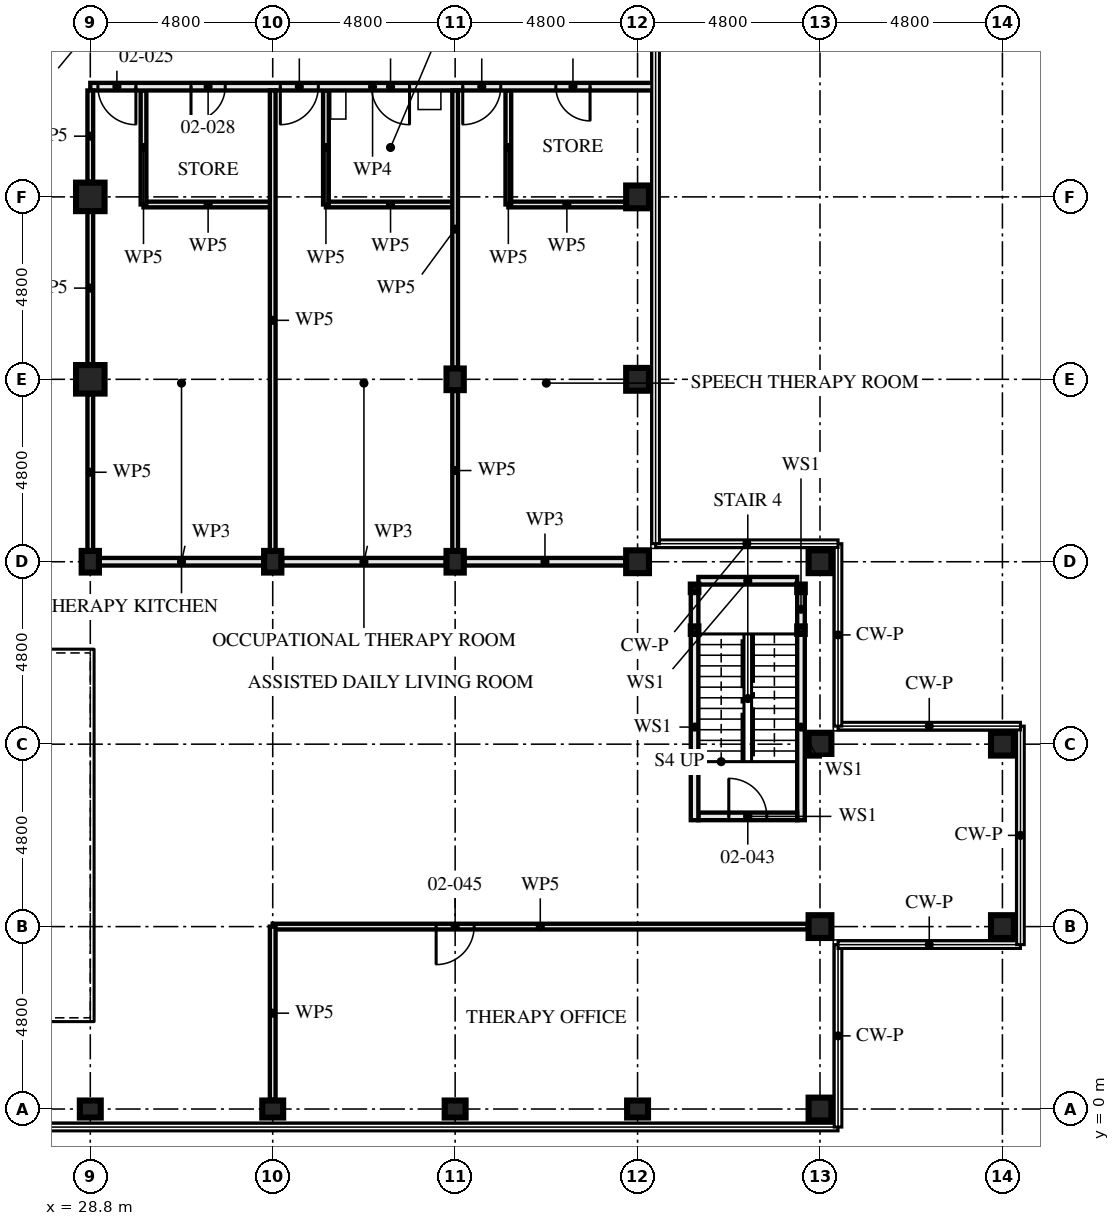
"""IFC4 building model, lengths in metres.
Left out: names, types, materials, properties, quantities, classifications, styles, units other than length and angle.
Written with IfcOpenShell. Run it as: python <this file> out.ifc"""

import sys

from ifc_helpers import new_model, si_unit, direction, frame, frame_2d, origin, origin_2d, place, context, subcontext, project, spatial, rectangle, hollow_rectangle, i_section, extrude, element, fill, save


model = new_model("IFC4")
c1 = context("Model", 3, precision=1e-05, world=origin(), true_north=direction((0.0, 1.0)))
c2 = subcontext(c1, "Body", "Model", "MODEL_VIEW")
j1 = project(units=[si_unit("LENGTHUNIT", "METRE"), si_unit("PLANEANGLEUNIT", "RADIAN")], contexts=[c1])
p1 = place(None, origin())
s1 = spatial("IfcSite", under=j1, at=p1, CompositionType="ELEMENT")
p2 = place(p1, origin())
s2 = spatial("IfcBuilding", under=s1, at=p2, CompositionType="ELEMENT")
p3 = place(p2, frame((0.0, 0.0, 9.0)))
s3 = spatial("IfcBuildingStorey", under=s2, at=p3, CompositionType="ELEMENT", Elevation=9.0)
p4 = place(p3, frame((28.8, 0.0, 0.0), z_axis=(0.0, 0.0, 1.0), x_axis=(0.0, 1.0, 0.0)))
e1 = element("IfcColumn", 1, at=p4, inside=s3, PredefinedType="COLUMN", context=c2, shape_type="SweptSolid", body=[
    extrude(i_section(OverallWidth=0.448, OverallDepth=0.55, WebThickness=0.072, FlangeThickness=0.115, FilletRadius=0.015, at=origin_2d()), origin(), (0.0, 0.0, 1.0), 4.5),
])
p5 = place(p3, frame((28.8, 14.4, 0.0), z_axis=(0.0, 0.0, 1.0), x_axis=(1.0, 0.0, 0.0)))
e2 = element("IfcColumn", 2, at=p5, inside=s3, PredefinedType="COLUMN", context=c2, shape_type="SweptSolid", body=[
    extrude(i_section(OverallWidth=0.454, OverallDepth=0.569, WebThickness=0.078, FlangeThickness=0.125, FilletRadius=0.015, at=origin_2d()), origin(), (0.0, 0.0, 1.0), 4.5),
])
for number, where, z_axis, x_axis in (
    (3, (28.8, 19.2, 0.0), (0.0, 0.0, 1.0), (1.0, 0.0, 0.0)),
    (4, (28.8, 24.0, 0.0), (0.0, 0.0, 1.0), (1.0, 0.0, 0.0)),
):
    element("IfcColumn", number, at=place(p3, frame(where, z_axis=z_axis, x_axis=x_axis)), inside=s3, PredefinedType="COLUMN", context=c2, shape_type="SweptSolid", body=[
        extrude(hollow_rectangle(XDim=0.75, YDim=0.75, WallThickness=0.08, at=origin_2d()), origin(), (0.0, 0.0, 1.0), 4.5),
    ])
p6 = place(p3, frame((33.6, 0.0, 0.0), z_axis=(0.0, 0.0, 1.0), x_axis=(0.0, 1.0, 0.0)))
e5 = element("IfcColumn", 5, at=p6, inside=s3, PredefinedType="COLUMN", context=c2, shape_type="SweptSolid", body=[
    extrude(i_section(OverallWidth=0.448, OverallDepth=0.55, WebThickness=0.072, FlangeThickness=0.115, FilletRadius=0.015, at=origin_2d()), origin(), (0.0, 0.0, 1.0), 4.5),
])
p7 = place(p3, frame((33.6, 14.4, 0.0), z_axis=(0.0, 0.0, 1.0), x_axis=(1.0, 0.0, 0.0)))
e6 = element("IfcColumn", 6, at=p7, inside=s3, PredefinedType="COLUMN", context=c2, shape_type="SweptSolid", body=[
    extrude(i_section(OverallWidth=0.454, OverallDepth=0.569, WebThickness=0.078, FlangeThickness=0.125, FilletRadius=0.015, at=origin_2d()), origin(), (0.0, 0.0, 1.0), 4.5),
])
p8 = place(p3, frame((38.4, 0.0, 0.0), z_axis=(0.0, 0.0, 1.0), x_axis=(0.0, 1.0, 0.0)))
e7 = element("IfcColumn", 7, at=p8, inside=s3, PredefinedType="COLUMN", context=c2, shape_type="SweptSolid", body=[
    extrude(i_section(OverallWidth=0.448, OverallDepth=0.55, WebThickness=0.072, FlangeThickness=0.115, FilletRadius=0.015, at=origin_2d()), origin(), (0.0, 0.0, 1.0), 4.5),
])
for number, where, z_axis, x_axis in (
    (8, (38.4, 14.4, 0.0), (0.0, 0.0, 1.0), (1.0, 0.0, 0.0)),
    (9, (38.4, 19.2, 0.0), (0.0, 0.0, 1.0), (1.0, 0.0, 0.0)),
):
    element("IfcColumn", number, at=place(p3, frame(where, z_axis=z_axis, x_axis=x_axis)), inside=s3, PredefinedType="COLUMN", context=c2, shape_type="SweptSolid", body=[
        extrude(i_section(OverallWidth=0.454, OverallDepth=0.569, WebThickness=0.078, FlangeThickness=0.125, FilletRadius=0.015, at=origin_2d()), origin(), (0.0, 0.0, 1.0), 4.5),
    ])
p9 = place(p3, frame((43.2, 0.0, 0.0), z_axis=(0.0, 0.0, 1.0), x_axis=(0.0, 1.0, 0.0)))
e10 = element("IfcColumn", 10, at=p9, inside=s3, PredefinedType="COLUMN", context=c2, shape_type="SweptSolid", body=[
    extrude(i_section(OverallWidth=0.448, OverallDepth=0.55, WebThickness=0.072, FlangeThickness=0.115, FilletRadius=0.015, at=origin_2d()), origin(), (0.0, 0.0, 1.0), 4.5),
])
p10 = place(p3, frame((43.2, 14.4, 0.0), z_axis=(0.0, 0.0, 1.0), x_axis=(0.0, 1.0, 0.0)))
e11 = element("IfcColumn", 11, at=p10, inside=s3, PredefinedType="COLUMN", context=c2, shape_type="SweptSolid", body=[
    extrude(hollow_rectangle(XDim=0.6, YDim=0.6, WallThickness=0.05, at=origin_2d()), origin(), (0.0, 0.0, 1.0), 4.5),
])
for number, where, z_axis, x_axis in (
    (12, (43.2, 19.2, 0.0), (0.0, 0.0, 1.0), (1.0, 0.0, 0.0)),
    (13, (43.2, 24.0, 0.0), (0.0, 0.0, 1.0), (1.0, 0.0, 0.0)),
):
    element("IfcColumn", number, at=place(p3, frame(where, z_axis=z_axis, x_axis=x_axis)), inside=s3, PredefinedType="COLUMN", context=c2, shape_type="SweptSolid", body=[
        extrude(hollow_rectangle(XDim=0.6, YDim=0.6, WallThickness=0.08, at=origin_2d()), origin(), (0.0, 0.0, 1.0), 4.5),
    ])
for number, where, z_axis, x_axis in (
    (14, (48.0, 0.0, 0.0), (0.0, 0.0, 1.0), (0.0, 1.0, 0.0)),
    (15, (48.0, 4.8, 0.0), (0.0, 0.0, 1.0), (0.0, 1.0, 0.0)),
    (16, (48.0, 9.6, 0.0), (0.0, 0.0, 1.0), (0.0, 1.0, 0.0)),
    (17, (48.0, 14.4, 0.0), (0.0, 0.0, 1.0), (0.0, 1.0, 0.0)),
    (18, (52.8, 4.8, 0.0), (0.0, 0.0, 1.0), (0.0, 1.0, 0.0)),
    (19, (52.8, 9.6, 0.0), (0.0, 0.0, 1.0), (0.0, 1.0, 0.0)),
):
    element("IfcColumn", number, at=place(p3, frame(where, z_axis=z_axis, x_axis=x_axis)), inside=s3, PredefinedType="COLUMN", context=c2, shape_type="SweptSolid", body=[
        extrude(hollow_rectangle(XDim=0.6, YDim=0.6, WallThickness=0.05, at=origin_2d()), origin(), (0.0, 0.0, 1.0), 4.5),
    ])
for number, where, z_axis, x_axis in (
    (20, (44.7, 13.7, 0.0), (0.0, 0.0, 1.0), (1.0, 0.0, 0.0)),
    (21, (47.5, 13.7, 0.0), (0.0, 0.0, 1.0), (1.0, 0.0, 0.0)),
    (22, (44.7, 12.6, 0.0), (0.0, 0.0, 1.0), (1.0, 0.0, 0.0)),
    (23, (47.5, 12.6, 0.0), (0.0, 0.0, 1.0), (1.0, 0.0, 0.0)),
):
    element("IfcColumn", number, at=place(p3, frame(where, z_axis=z_axis, x_axis=x_axis)), inside=s3, PredefinedType="COLUMN", context=c2, shape_type="SweptSolid", body=[
        extrude(hollow_rectangle(XDim=0.2, YDim=0.2, WallThickness=0.008, at=origin_2d()), origin(), (0.0, 0.0, 1.0), 4.33),
    ])
p11 = place(p3, frame((30.2, 23.8, 0.0), z_axis=(0.0, 0.0, 1.0), x_axis=(0.0, 1.0, 0.0)))
e24 = element("IfcWall", 24, at=p11, inside=s3, PredefinedType="PARTITIONING", context=c2, shape_type="SweptSolid", body=[
    extrude(rectangle(XDim=3.0, YDim=0.15, at=frame_2d((1.5, 0.0))), origin(), (0.0, 0.0, 1.0), 3.55),
])
p12 = place(p3, frame((30.2, 23.8, 0.0), z_axis=(0.0, 0.0, 1.0), x_axis=(1.0, 0.0, 0.0)))
e25 = element("IfcWall", 25, at=p12, inside=s3, PredefinedType="PARTITIONING", context=c2, shape_type="SweptSolid", body=[
    extrude(rectangle(XDim=3.4, YDim=0.15, at=frame_2d((1.7, 0.0))), origin(), (0.0, 0.0, 1.0), 4.33),
])
p13 = place(p3, frame((35.0, 23.8, 0.0), z_axis=(0.0, 0.0, 1.0), x_axis=(0.0, 1.0, 0.0)))
e26 = element("IfcWall", 26, at=p13, inside=s3, PredefinedType="PARTITIONING", context=c2, shape_type="SweptSolid", body=[
    extrude(rectangle(XDim=3.0, YDim=0.15, at=frame_2d((1.5, 0.0))), origin(), (0.0, 0.0, 1.0), 3.55),
])
p14 = place(p3, frame((35.0, 23.8, 0.0), z_axis=(0.0, 0.0, 1.0), x_axis=(1.0, 0.0, 0.0)))
e27 = element("IfcWall", 27, at=p14, inside=s3, PredefinedType="PARTITIONING", context=c2, shape_type="SweptSolid", body=[
    extrude(rectangle(XDim=3.4, YDim=0.15, at=frame_2d((1.7, 0.0))), origin(), (0.0, 0.0, 1.0), 4.33),
])
p15 = place(p3, frame((39.8, 23.8, 0.0), z_axis=(0.0, 0.0, 1.0), x_axis=(0.0, 1.0, 0.0)))
e28 = element("IfcWall", 28, at=p15, inside=s3, PredefinedType="PARTITIONING", context=c2, shape_type="SweptSolid", body=[
    extrude(rectangle(XDim=3.0, YDim=0.15, at=frame_2d((1.5, 0.0))), origin(), (0.0, 0.0, 1.0), 3.55),
])
p16 = place(p3, frame((39.8, 23.8, 0.0), z_axis=(0.0, 0.0, 1.0), x_axis=(1.0, 0.0, 0.0)))
e29 = element("IfcWall", 29, at=p16, inside=s3, PredefinedType="PARTITIONING", context=c2, shape_type="SweptSolid", body=[
    extrude(rectangle(XDim=3.08, YDim=0.15, at=frame_2d((1.54, 0.0))), origin(), (0.0, 0.0, 1.0), 4.33),
])
p17 = place(p3, frame((33.6, 14.705, 0.0), z_axis=(0.0, 0.0, 1.0), x_axis=(0.0, 1.0, 0.0)))
e30 = element("IfcWall", 30, at=p17, inside=s3, PredefinedType="PARTITIONING", context=c2, shape_type="SweptSolid", body=[
    extrude(rectangle(XDim=12.095, YDim=0.15, at=frame_2d((6.048, 0.0))), origin(), (0.0, 0.0, 1.0), 3.55),
])
p18 = place(p3, frame((38.4, 14.705, 0.0), z_axis=(0.0, 0.0, 1.0), x_axis=(0.0, 1.0, 0.0)))
e31 = element("IfcWall", 31, at=p18, inside=s3, PredefinedType="PARTITIONING", context=c2, shape_type="SweptSolid", body=[
    extrude(rectangle(XDim=4.191, YDim=0.15, at=frame_2d((2.095, 0.0))), origin(), (0.0, 0.0, 1.0), 3.55),
])
p19 = place(p3, frame((38.4, 19.504, 0.0), z_axis=(0.0, 0.0, 1.0), x_axis=(0.0, 1.0, 0.0)))
e32 = element("IfcWall", 32, at=p19, inside=s3, PredefinedType="PARTITIONING", context=c2, shape_type="SweptSolid", body=[
    extrude(rectangle(XDim=7.296, YDim=0.15, at=frame_2d((3.648, 0.0))), origin(), (0.0, 0.0, 1.0), 3.55),
])
p20 = place(p3, frame((28.8, 26.9, 0.0), z_axis=(0.0, 0.0, 1.0), x_axis=(1.0, 0.0, 0.0)))
e33 = element("IfcWall", 33, at=p20, inside=s3, PredefinedType="PARTITIONING", context=c2, shape_type="SweptSolid", body=[
    extrude(rectangle(XDim=14.855, YDim=0.2, at=frame_2d((7.427, 0.0))), origin(), (0.0, 0.0, 1.0), 3.32),
])
p21 = place(p20, frame((0.2, 0.0, 0.0)))
e34 = element("IfcOpeningElement", 34, at=p21, cuts=e33, PredefinedType="OPENING", context=c2, shape_type="SweptSolid", body=[
    extrude(rectangle(XDim=1.0, YDim=2.4, at=frame_2d((0.5, 1.2))), frame((0.0, 0.111, 0.0), z_axis=(0.0, -1.0, 0.0), x_axis=(1.0, 0.0, 0.0)), (0.0, 0.0, 1.0), 0.221),
])
p22 = place(p20, frame((5.0, 0.0, 0.0)))
e35 = element("IfcOpeningElement", 35, at=p22, cuts=e33, PredefinedType="OPENING", context=c2, shape_type="SweptSolid", body=[
    extrude(rectangle(XDim=1.0, YDim=2.4, at=frame_2d((0.5, 1.2))), frame((0.0, 0.111, 0.0), z_axis=(0.0, -1.0, 0.0), x_axis=(1.0, 0.0, 0.0)), (0.0, 0.0, 1.0), 0.221),
])
p23 = place(p20, frame((9.8, 0.0, 0.0)))
e36 = element("IfcOpeningElement", 36, at=p23, cuts=e33, PredefinedType="OPENING", context=c2, shape_type="SweptSolid", body=[
    extrude(rectangle(XDim=1.0, YDim=2.4, at=frame_2d((0.5, 1.2))), frame((0.0, 0.111, 0.0), z_axis=(0.0, -1.0, 0.0), x_axis=(1.0, 0.0, 0.0)), (0.0, 0.0, 1.0), 0.221),
])
p24 = place(p20, frame((2.65, 0.0, 0.0)))
e37 = element("IfcOpeningElement", 37, at=p24, cuts=e33, PredefinedType="OPENING", context=c2, shape_type="SweptSolid", body=[
    extrude(rectangle(XDim=0.9, YDim=2.1, at=frame_2d((0.45, 1.05))), frame((0.0, 0.111, 0.0), z_axis=(0.0, -1.0, 0.0), x_axis=(1.0, 0.0, 0.0)), (0.0, 0.0, 1.0), 0.221),
])
p25 = place(p20, frame((7.4, 0.0, 0.0)))
e38 = element("IfcOpeningElement", 38, at=p25, cuts=e33, PredefinedType="OPENING", context=c2, shape_type="SweptSolid", body=[
    extrude(rectangle(XDim=1.0, YDim=2.1, at=frame_2d((0.5, 1.05))), frame((0.0, 0.111, 0.0), z_axis=(0.0, -1.0, 0.0), x_axis=(1.0, 0.0, 0.0)), (0.0, 0.0, 1.0), 0.221),
])
p26 = place(p20, frame((12.25, 0.0, 0.0)))
e39 = element("IfcOpeningElement", 39, at=p26, cuts=e33, PredefinedType="OPENING", context=c2, shape_type="SweptSolid", body=[
    extrude(rectangle(XDim=0.9, YDim=2.1, at=frame_2d((0.45, 1.05))), frame((0.0, 0.111, 0.0), z_axis=(0.0, -1.0, 0.0), x_axis=(1.0, 0.0, 0.0)), (0.0, 0.0, 1.0), 0.221),
])
p27 = place(p3, frame((44.7, 13.6, 0.0), z_axis=(0.0, 0.0, 1.0), x_axis=(0.0, -1.0, 0.0)))
e40 = element("IfcWall", 40, at=p27, inside=s3, PredefinedType="SOLIDWALL", context=c2, shape_type="SweptSolid", body=[
    extrude(rectangle(XDim=0.9, YDim=0.2, at=frame_2d((0.45, 0.0))), origin(), (0.0, 0.0, 1.0), 3.99),
])
p28 = place(p3, frame((44.7, 12.5, 0.0), z_axis=(0.0, 0.0, 1.0), x_axis=(0.0, -1.0, 0.0)))
e41 = element("IfcWall", 41, at=p28, inside=s3, PredefinedType="SOLIDWALL", context=c2, shape_type="SweptSolid", body=[
    extrude(rectangle(XDim=4.9, YDim=0.2, at=frame_2d((2.45, 0.0))), origin(), (0.0, 0.0, 1.0), 3.99),
])
p29 = place(p3, frame((47.5, 13.6, 0.0), z_axis=(0.0, 0.0, 1.0), x_axis=(0.0, -1.0, 0.0)))
e42 = element("IfcWall", 42, at=p29, inside=s3, PredefinedType="SOLIDWALL", context=c2, shape_type="SweptSolid", body=[
    extrude(rectangle(XDim=0.9, YDim=0.2, at=frame_2d((0.45, 0.0))), origin(), (0.0, 0.0, 1.0), 3.99),
])
p30 = place(p3, frame((47.5, 12.5, 0.0), z_axis=(0.0, 0.0, 1.0), x_axis=(0.0, -1.0, 0.0)))
e43 = element("IfcWall", 43, at=p30, inside=s3, PredefinedType="SOLIDWALL", context=c2, shape_type="SweptSolid", body=[
    extrude(rectangle(XDim=4.9, YDim=0.2, at=frame_2d((2.45, 0.0))), origin(), (0.0, 0.0, 1.0), 3.99),
])
p31 = place(p3, frame((44.8, 13.9, 0.0), z_axis=(0.0, 0.0, 1.0), x_axis=(1.0, 0.0, 0.0)))
e44 = element("IfcWall", 44, at=p31, inside=s3, PredefinedType="SOLIDWALL", context=c2, shape_type="SweptSolid", body=[
    extrude(rectangle(XDim=2.6, YDim=0.2, at=frame_2d((1.3, 0.0))), origin(), (0.0, 0.0, 1.0), 4.33),
])
p32 = place(p3, frame((44.8, 7.7, 0.0), z_axis=(0.0, 0.0, 1.0), x_axis=(1.0, 0.0, 0.0)))
e45 = element("IfcWall", 45, at=p32, inside=s3, PredefinedType="SOLIDWALL", context=c2, shape_type="SweptSolid", body=[
    extrude(rectangle(XDim=2.6, YDim=0.2, at=frame_2d((1.3, 0.0))), origin(), (0.0, 0.0, 1.0), 4.33),
])
p33 = place(p32, frame((0.8, 0.0, 0.0)))
e46 = element("IfcOpeningElement", 46, at=p33, cuts=e45, PredefinedType="OPENING", context=c2, shape_type="SweptSolid", body=[
    extrude(rectangle(XDim=1.0, YDim=2.1, at=frame_2d((0.5, 1.05))), frame((0.0, 0.111, 0.0), z_axis=(0.0, -1.0, 0.0), x_axis=(1.0, 0.0, 0.0)), (0.0, 0.0, 1.0), 0.221),
])
p34 = place(p3, frame((33.6, 4.8, 0.0), z_axis=(0.0, 0.0, 1.0), x_axis=(1.0, 0.0, 0.0)))
e47 = element("IfcWall", 47, at=p34, inside=s3, PredefinedType="PARTITIONING", context=c2, shape_type="SweptSolid", body=[
    extrude(rectangle(XDim=14.08, YDim=0.15, at=frame_2d((7.04, 0.0))), origin(), (0.0, 0.0, 1.0), 3.55),
])
p35 = place(p34, frame((4.3, 0.0, 0.0)))
e48 = element("IfcOpeningElement", 48, at=p35, cuts=e47, PredefinedType="OPENING", context=c2, shape_type="SweptSolid", body=[
    extrude(rectangle(XDim=1.0, YDim=2.4, at=frame_2d((0.5, 1.2))), frame((0.0, 0.085, 0.0), z_axis=(0.0, -1.0, 0.0), x_axis=(1.0, 0.0, 0.0)), (0.0, 0.0, 1.0), 0.171),
])
p36 = place(p3, frame((33.6, 0.244, 0.0), z_axis=(0.0, 0.0, 1.0), x_axis=(0.0, 1.0, 0.0)))
e49 = element("IfcWall", 49, at=p36, inside=s3, PredefinedType="PARTITIONING", context=c2, shape_type="SweptSolid", body=[
    extrude(rectangle(XDim=4.556, YDim=0.15, at=frame_2d((2.278, 0.0))), origin(), (0.0, 0.0, 1.0), 3.55),
])
p37 = place(p3, frame((29.047, 14.4, 0.0), z_axis=(0.0, 0.0, 1.0), x_axis=(1.0, 0.0, 0.0)))
e50 = element("IfcWall", 50, at=p37, inside=s3, PredefinedType="PARTITIONING", context=c2, shape_type="SweptSolid", body=[
    extrude(rectangle(XDim=4.306, YDim=0.2, at=frame_2d((2.153, 0.0))), origin(), (0.0, 0.0, 1.0), 3.32),
])
p38 = place(p3, frame((33.847, 14.4, 0.0), z_axis=(0.0, 0.0, 1.0), x_axis=(1.0, 0.0, 0.0)))
e51 = element("IfcWall", 51, at=p38, inside=s3, PredefinedType="PARTITIONING", context=c2, shape_type="SweptSolid", body=[
    extrude(rectangle(XDim=4.306, YDim=0.2, at=frame_2d((2.153, 0.0))), origin(), (0.0, 0.0, 1.0), 3.32),
])
p39 = place(p3, frame((38.647, 14.4, 0.0), z_axis=(0.0, 0.0, 1.0), x_axis=(1.0, 0.0, 0.0)))
e52 = element("IfcWall", 52, at=p39, inside=s3, PredefinedType="PARTITIONING", context=c2, shape_type="SweptSolid", body=[
    extrude(rectangle(XDim=4.233, YDim=0.2, at=frame_2d((2.116, 0.0))), origin(), (0.0, 0.0, 1.0), 3.32),
])
p40 = place(p3, frame((28.8, 14.705, 0.0), z_axis=(0.0, 0.0, 1.0), x_axis=(0.0, 1.0, 0.0)))
e53 = element("IfcWall", 53, at=p40, inside=s3, PredefinedType="PARTITIONING", context=c2, shape_type="SweptSolid", body=[
    extrude(rectangle(XDim=4.1, YDim=0.15, at=frame_2d((2.05, 0.0))), origin(), (0.0, 0.0, 1.0), 3.32),
])
p41 = place(p3, frame((28.8, 19.595, 0.0), z_axis=(0.0, 0.0, 1.0), x_axis=(0.0, 1.0, 0.0)))
e54 = element("IfcWall", 54, at=p41, inside=s3, PredefinedType="PARTITIONING", context=c2, shape_type="SweptSolid", body=[
    extrude(rectangle(XDim=4.01, YDim=0.15, at=frame_2d((2.005, 0.0))), origin(), (0.0, 0.0, 1.0), 3.32),
])
p42 = place(p3, frame((28.8, 24.395, 0.0), z_axis=(0.0, 0.0, 1.0), x_axis=(0.0, 1.0, 0.0)))
e55 = element("IfcWall", 55, at=p42, inside=s3, PredefinedType="PARTITIONING", context=c2, shape_type="SweptSolid", body=[
    extrude(rectangle(XDim=2.405, YDim=0.15, at=frame_2d((1.203, 0.0))), origin(), (0.0, 0.0, 1.0), 3.32),
])
p43 = place(p21, frame((1.0, 0.0, 0.0), z_axis=(0.0, 0.0, 1.0), x_axis=(-1.0, 0.0, 0.0)))
e56 = element("IfcDoor", 56, at=p43, inside=s3, OperationType="SINGLE_SWING_RIGHT", PredefinedType="DOOR", context=c2, shape_type="SweptSolid", body=[
    extrude(rectangle(XDim=1.0, YDim=2.4, at=frame_2d((0.5, 1.2))), frame((0.0, 0.027, 0.0), z_axis=(0.0, -1.0, 0.0), x_axis=(1.0, 0.0, 0.0)), (0.0, 0.0, 1.0), 0.054),
])
fill(e34, e56)
p44 = place(p22, frame((1.0, 0.0, 0.0), z_axis=(0.0, 0.0, 1.0), x_axis=(-1.0, 0.0, 0.0)))
e57 = element("IfcDoor", 57, at=p44, inside=s3, OperationType="SINGLE_SWING_LEFT", PredefinedType="DOOR", context=c2, shape_type="SweptSolid", body=[
    extrude(rectangle(XDim=1.0, YDim=2.4, at=frame_2d((0.5, 1.2))), frame((0.0, 0.027, 0.0), z_axis=(0.0, -1.0, 0.0), x_axis=(1.0, 0.0, 0.0)), (0.0, 0.0, 1.0), 0.054),
])
fill(e35, e57)
p45 = place(p23, frame((1.0, 0.0, 0.0), z_axis=(0.0, 0.0, 1.0), x_axis=(-1.0, 0.0, 0.0)))
e58 = element("IfcDoor", 58, at=p45, inside=s3, OperationType="SINGLE_SWING_LEFT", PredefinedType="DOOR", context=c2, shape_type="SweptSolid", body=[
    extrude(rectangle(XDim=1.0, YDim=2.4, at=frame_2d((0.5, 1.2))), frame((0.0, 0.027, 0.0), z_axis=(0.0, -1.0, 0.0), x_axis=(1.0, 0.0, 0.0)), (0.0, 0.0, 1.0), 0.054),
])
fill(e36, e58)
p46 = place(p24, frame((0.9, 0.0, 0.0), z_axis=(0.0, 0.0, 1.0), x_axis=(-1.0, 0.0, 0.0)))
e59 = element("IfcDoor", 59, at=p46, inside=s3, OperationType="SINGLE_SWING_LEFT", PredefinedType="DOOR", context=c2, shape_type="SweptSolid", body=[
    extrude(rectangle(XDim=0.9, YDim=2.1, at=frame_2d((0.45, 1.05))), frame((0.0, 0.027, 0.0), z_axis=(0.0, -1.0, 0.0), x_axis=(1.0, 0.0, 0.0)), (0.0, 0.0, 1.0), 0.054),
])
fill(e37, e59)
p47 = place(p25, frame((1.0, 0.0, 0.0), z_axis=(0.0, 0.0, 1.0), x_axis=(-1.0, 0.0, 0.0)))
e60 = element("IfcDoor", 60, at=p47, inside=s3, OperationType="SINGLE_SWING_RIGHT", PredefinedType="DOOR", context=c2, shape_type="SweptSolid", body=[
    extrude(rectangle(XDim=1.0, YDim=2.1, at=frame_2d((0.5, 1.05))), frame((0.0, 0.027, 0.0), z_axis=(0.0, -1.0, 0.0), x_axis=(1.0, 0.0, 0.0)), (0.0, 0.0, 1.0), 0.054),
])
fill(e38, e60)
p48 = place(p26, frame((0.9, 0.0, 0.0), z_axis=(0.0, 0.0, 1.0), x_axis=(-1.0, 0.0, 0.0)))
e61 = element("IfcDoor", 61, at=p48, inside=s3, OperationType="SINGLE_SWING_RIGHT", PredefinedType="DOOR", context=c2, shape_type="SweptSolid", body=[
    extrude(rectangle(XDim=0.9, YDim=2.1, at=frame_2d((0.45, 1.05))), frame((0.0, 0.027, 0.0), z_axis=(0.0, -1.0, 0.0), x_axis=(1.0, 0.0, 0.0)), (0.0, 0.0, 1.0), 0.054),
])
fill(e39, e61)
p49 = place(p33, origin())
e62 = element("IfcDoor", 62, at=p49, inside=s3, OperationType="SINGLE_SWING_RIGHT", PredefinedType="DOOR", context=c2, shape_type="SweptSolid", body=[
    extrude(rectangle(XDim=1.0, YDim=2.1, at=frame_2d((0.5, 1.05))), frame((0.0, 0.032, 0.0), z_axis=(0.0, -1.0, 0.0), x_axis=(1.0, 0.0, 0.0)), (0.0, 0.0, 1.0), 0.064),
])
fill(e46, e62)
p50 = place(p35, frame((1.0, 0.0, 0.0), z_axis=(0.0, 0.0, 1.0), x_axis=(-1.0, 0.0, 0.0)))
e63 = element("IfcDoor", 63, at=p50, inside=s3, OperationType="SINGLE_SWING_LEFT", PredefinedType="DOOR", context=c2, shape_type="SweptSolid", body=[
    extrude(rectangle(XDim=1.0, YDim=2.4, at=frame_2d((0.5, 1.2))), frame((0.0, 0.027, 0.0), z_axis=(0.0, -1.0, 0.0), x_axis=(1.0, 0.0, 0.0)), (0.0, 0.0, 1.0), 0.054),
])
fill(e48, e63)
save(model, sys.argv[1])
